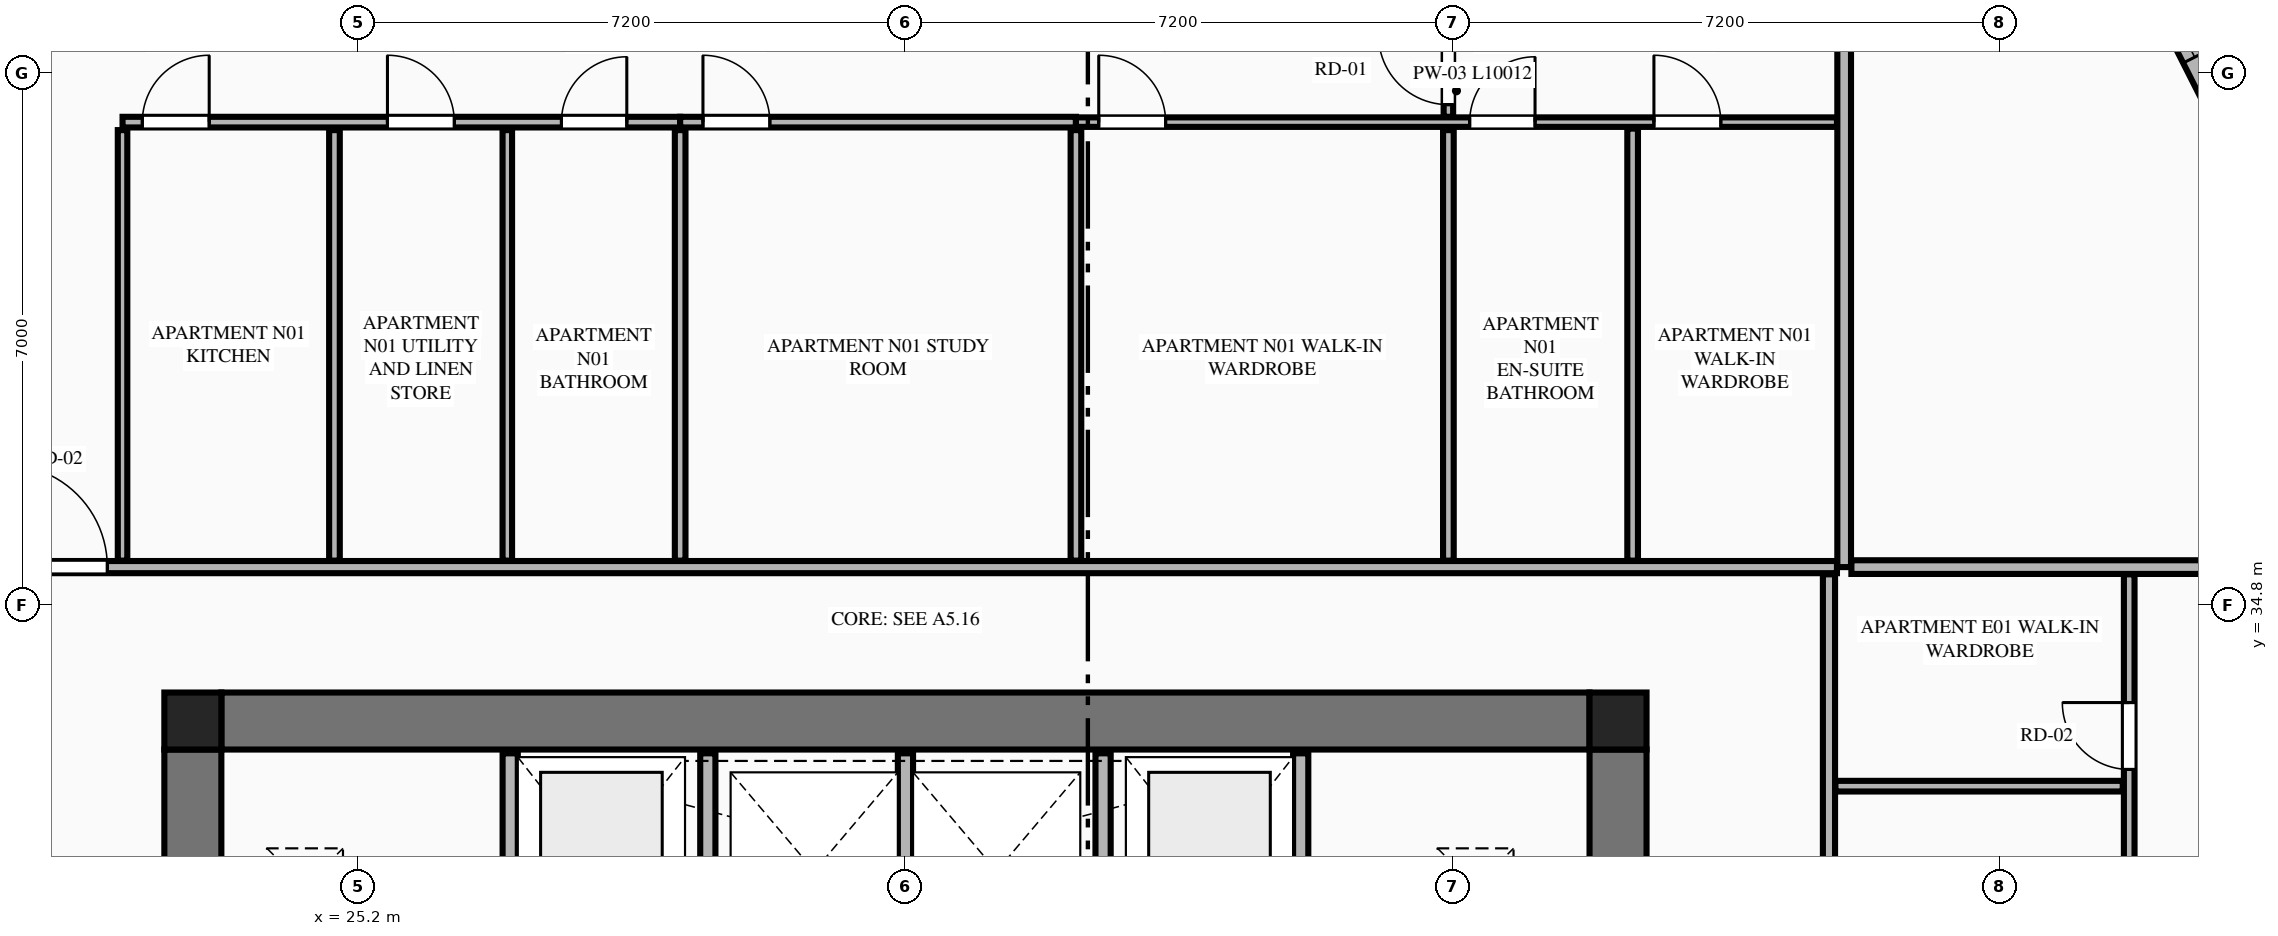
"""IFC4 building model, lengths in metres.
Left out: names, types, materials, properties, quantities, classifications, styles, units other than length and angle.
Written with IfcOpenShell. Run it as: python <this file> out.ifc"""

import sys

from ifc_helpers import new_model, si_unit, direction, frame, frame_2d, origin, origin_2d, place, context, subcontext, project, spatial, rectangle, extrude, element, fill, save


model = new_model("IFC4")
c1 = context("Model", 3, precision=1e-05, world=origin(), true_north=direction((0.0, 1.0)))
c2 = subcontext(c1, "Body", "Model", "MODEL_VIEW")
j1 = project(units=[si_unit("LENGTHUNIT", "METRE"), si_unit("PLANEANGLEUNIT", "RADIAN")], contexts=[c1])
p1 = place(None, origin())
s1 = spatial("IfcSite", under=j1, at=p1, CompositionType="ELEMENT")
p2 = place(p1, origin())
s2 = spatial("IfcBuilding", under=s1, at=p2, CompositionType="ELEMENT")
p3 = place(p2, frame((0.0, 0.0, 130.35)))
s3 = spatial("IfcBuildingStorey", under=s2, at=p3, CompositionType="ELEMENT", Elevation=130.35)
for number, where, z_axis, x_axis in (
    (1, (41.775, 33.275, 0.0), (0.0, 0.0, 1.0), (1.0, 0.0, 0.0)),
    (2, (23.025, 33.275, 0.0), (0.0, 0.0, 1.0), (1.0, 0.0, 0.0)),
):
    element("IfcColumn", number, at=place(p3, frame(where, z_axis=z_axis, x_axis=x_axis)), inside=s3, PredefinedType="COLUMN", context=c2, shape_type="SweptSolid", body=[
        extrude(rectangle(XDim=0.75, YDim=0.75, at=origin_2d()), origin(), (0.0, 0.0, 1.0), 3.55),
    ])
p4 = place(p3, frame((23.4, 33.275, 0.0), z_axis=(0.0, 0.0, 1.0), x_axis=(1.0, 0.0, 0.0)))
e3 = element("IfcWall", 3, at=p4, inside=s3, PredefinedType="SHEAR", context=c2, shape_type="SweptSolid", body=[
    extrude(rectangle(XDim=18.0, YDim=0.75, at=frame_2d((9.0, 0.0))), origin(), (0.0, 0.0, 1.0), 3.34),
])
p5 = place(p3, frame((23.025, 18.9, 0.0), z_axis=(0.0, 0.0, 1.0), x_axis=(0.0, 1.0, 0.0)))
e4 = element("IfcWall", 4, at=p5, inside=s3, PredefinedType="SHEAR", context=c2, shape_type="SweptSolid", body=[
    extrude(rectangle(XDim=14.0, YDim=0.75, at=frame_2d((7.0, 0.0))), origin(), (0.0, 0.0, 1.0), 3.34),
])
p6 = place(p5, frame((2.94, 0.0, 0.0)))
e5 = element("IfcOpeningElement", 5, at=p6, cuts=e4, PredefinedType="OPENING", context=c2, shape_type="SweptSolid", body=[
    extrude(rectangle(XDim=1.22, YDim=2.25, at=frame_2d((0.61, 1.125))), frame((0.0, 0.385, 0.0), z_axis=(0.0, -1.0, 0.0), x_axis=(1.0, 0.0, 0.0)), (0.0, 0.0, 1.0), 0.77),
])
p7 = place(p3, frame((41.775, 18.9, 0.0), z_axis=(0.0, 0.0, 1.0), x_axis=(0.0, 1.0, 0.0)))
e6 = element("IfcWall", 6, at=p7, inside=s3, PredefinedType="SHEAR", context=c2, shape_type="SweptSolid", body=[
    extrude(rectangle(XDim=14.0, YDim=0.75, at=frame_2d((7.0, 0.0))), origin(), (0.0, 0.0, 1.0), 3.34),
])
p8 = place(p7, frame((2.94, 0.0, 0.0)))
e7 = element("IfcOpeningElement", 7, at=p8, cuts=e6, PredefinedType="OPENING", context=c2, shape_type="SweptSolid", body=[
    extrude(rectangle(XDim=1.22, YDim=2.25, at=frame_2d((0.61, 1.125))), frame((0.0, 0.385, 0.0), z_axis=(0.0, -1.0, 0.0), x_axis=(1.0, 0.0, 0.0)), (0.0, 0.0, 1.0), 0.77),
])
for number, where, z_axis, x_axis in (
    (8, (27.2, 30.0, 0.0), (0.0, 0.0, 1.0), (0.0, 1.0, 0.0)),
    (9, (29.8, 30.0, 0.0), (0.0, 0.0, 1.0), (0.0, 1.0, 0.0)),
    (10, (32.4, 30.0, 0.0), (0.0, 0.0, 1.0), (0.0, 1.0, 0.0)),
    (11, (35.0, 30.0, 0.0), (0.0, 0.0, 1.0), (0.0, 1.0, 0.0)),
    (12, (37.6, 30.0, 0.0), (0.0, 0.0, 1.0), (0.0, 1.0, 0.0)),
):
    element("IfcWall", number, at=place(p3, frame(where, z_axis=z_axis, x_axis=x_axis)), inside=s3, PredefinedType="PLUMBINGWALL", context=c2, shape_type="SweptSolid", body=[
        extrude(rectangle(XDim=2.85, YDim=0.2, at=frame_2d((1.425, 0.0))), origin(), (0.0, 0.0, 1.0), 3.34),
    ])
p9 = place(p3, frame((50.251, 40.251, 0.0), z_axis=(0.0, 0.0, 1.0), x_axis=(-0.451548465867, 0.892246593142, 0.0)))
e13 = element("IfcWall", 13, at=p9, inside=s3, PredefinedType="STANDARD", context=c2, shape_type="SweptSolid", body=[
    extrude(rectangle(XDim=5.04, YDim=0.34, at=frame_2d((2.52, 0.0))), origin(), (0.0, 0.0, 1.0), 2.797),
])
p10 = place(p9, frame((1.97, 0.0, 0.75)))
e14 = element("IfcOpeningElement", 14, at=p10, cuts=e13, PredefinedType="OPENING", context=c2, shape_type="SweptSolid", body=[
    extrude(rectangle(XDim=1.1, YDim=1.897, at=frame_2d((0.55, 0.948))), frame((0.0, 0.18, 0.0), z_axis=(0.0, -1.0, 0.0), x_axis=(1.0, 0.0, 0.0)), (0.0, 0.0, 1.0), 0.36),
])
p11 = place(p3, frame((44.75, 35.3, 0.0), z_axis=(0.0, 0.0, 1.0), x_axis=(0.0, 1.0, 0.0)))
e15 = element("IfcWall", 15, at=p11, inside=s3, PredefinedType="PARTITIONING", context=c2, shape_type="SweptSolid", body=[
    extrude(rectangle(XDim=12.195, YDim=0.18, at=frame_2d((6.098, 0.0))), origin(), (0.0, 0.0, 1.0), 3.34),
])
p12 = place(p3, frame((20.145, 35.3, 0.0), z_axis=(0.0, 0.0, 1.0), x_axis=(1.0, 0.0, 0.0)))
e16 = element("IfcWall", 16, at=p12, inside=s3, PredefinedType="PARTITIONING", context=c2, shape_type="SweptSolid", body=[
    extrude(rectangle(XDim=24.51, YDim=0.16, at=frame_2d((12.255, 0.0))), origin(), (0.0, 0.0, 1.0), 3.34),
])
p13 = place(p12, frame((0.405, 0.0, 0.0)))
e17 = element("IfcOpeningElement", 17, at=p13, cuts=e16, PredefinedType="OPENING", context=c2, shape_type="SweptSolid", body=[
    extrude(rectangle(XDim=1.35, YDim=2.35, at=frame_2d((0.675, 1.175))), frame((0.0, 0.09, 0.0), z_axis=(0.0, -1.0, 0.0), x_axis=(1.0, 0.0, 0.0)), (0.0, 0.0, 1.0), 0.18),
])
p14 = place(p3, frame((22.1, 35.385, 0.0), z_axis=(0.0, 0.0, 1.0), x_axis=(0.0, 1.0, 0.0)))
e18 = element("IfcWall", 18, at=p14, inside=s3, PredefinedType="PARTITIONING", context=c2, shape_type="SweptSolid", body=[
    extrude(rectangle(XDim=5.664, YDim=0.125, at=frame_2d((2.832, 0.0))), origin(), (0.0, 0.0, 1.0), 2.722),
])
p15 = place(p3, frame((22.1, 41.154, 0.0), z_axis=(0.0, 0.0, 1.0), x_axis=(1.0, 0.0, 0.0)))
e19 = element("IfcWall", 19, at=p15, inside=s3, PredefinedType="PLUMBINGWALL", context=c2, shape_type="SweptSolid", body=[
    extrude(rectangle(XDim=7.336, YDim=0.14, at=frame_2d((3.668, 0.0))), origin(), (0.0, 0.0, 1.0), 3.34),
])
p16 = place(p15, frame((5.774, 0.0, 0.0)))
e20 = element("IfcOpeningElement", 20, at=p16, cuts=e19, PredefinedType="OPENING", context=c2, shape_type="SweptSolid", body=[
    extrude(rectangle(XDim=0.86, YDim=2.1, at=frame_2d((0.43, 1.05))), frame((0.0, 0.08, 0.0), z_axis=(0.0, -1.0, 0.0), x_axis=(1.0, 0.0, 0.0)), (0.0, 0.0, 1.0), 0.16),
])
p17 = place(p15, frame((0.26, 0.0, 0.0)))
e21 = element("IfcOpeningElement", 21, at=p17, cuts=e19, PredefinedType="OPENING", context=c2, shape_type="SweptSolid", body=[
    extrude(rectangle(XDim=0.88, YDim=2.15, at=frame_2d((0.44, 1.075))), frame((0.0, 0.08, 0.0), z_axis=(0.0, -1.0, 0.0), x_axis=(1.0, 0.0, 0.0)), (0.0, 0.0, 1.0), 0.16),
])
p18 = place(p15, frame((3.485, 0.0, 0.0)))
e22 = element("IfcOpeningElement", 22, at=p18, cuts=e19, PredefinedType="OPENING", context=c2, shape_type="SweptSolid", body=[
    extrude(rectangle(XDim=0.88, YDim=2.15, at=frame_2d((0.44, 1.075))), frame((0.0, 0.08, 0.0), z_axis=(0.0, -1.0, 0.0), x_axis=(1.0, 0.0, 0.0)), (0.0, 0.0, 1.0), 0.16),
])
p19 = place(p3, frame((29.436, 41.154, 0.0), z_axis=(0.0, 0.0, 1.0), x_axis=(1.0, 0.0, 0.0)))
e23 = element("IfcWall", 23, at=p19, inside=s3, PredefinedType="PLUMBINGWALL", context=c2, shape_type="SweptSolid", body=[
    extrude(rectangle(XDim=5.207, YDim=0.14, at=frame_2d((2.604, 0.0))), origin(), (0.0, 0.0, 1.0), 3.34),
])
p20 = place(p19, frame((0.3, 0.0, 0.0)))
e24 = element("IfcOpeningElement", 24, at=p20, cuts=e23, PredefinedType="OPENING", context=c2, shape_type="SweptSolid", body=[
    extrude(rectangle(XDim=0.88, YDim=2.15, at=frame_2d((0.44, 1.075))), frame((0.0, 0.08, 0.0), z_axis=(0.0, -1.0, 0.0), x_axis=(1.0, 0.0, 0.0)), (0.0, 0.0, 1.0), 0.16),
])
p21 = place(p3, frame((34.643, 41.154, 0.0), z_axis=(0.0, 0.0, 1.0), x_axis=(1.0, 0.0, 0.0)))
e25 = element("IfcWall", 25, at=p21, inside=s3, PredefinedType="PARTITIONING", context=c2, shape_type="SweptSolid", body=[
    extrude(rectangle(XDim=10.012, YDim=0.125, at=frame_2d((5.006, 0.0))), origin(), (0.0, 0.0, 1.0), 3.34),
])
p22 = place(p21, frame((5.18, 0.0, 0.0)))
e26 = element("IfcOpeningElement", 26, at=p22, cuts=e25, PredefinedType="OPENING", context=c2, shape_type="SweptSolid", body=[
    extrude(rectangle(XDim=0.86, YDim=2.1, at=frame_2d((0.43, 1.05))), frame((0.0, 0.073, 0.0), z_axis=(0.0, -1.0, 0.0), x_axis=(1.0, 0.0, 0.0)), (0.0, 0.0, 1.0), 0.145),
])
p23 = place(p21, frame((7.604, 0.0, 0.0)))
e27 = element("IfcOpeningElement", 27, at=p23, cuts=e25, PredefinedType="OPENING", context=c2, shape_type="SweptSolid", body=[
    extrude(rectangle(XDim=0.88, YDim=2.15, at=frame_2d((0.44, 1.075))), frame((0.0, 0.073, 0.0), z_axis=(0.0, -1.0, 0.0), x_axis=(1.0, 0.0, 0.0)), (0.0, 0.0, 1.0), 0.145),
])
p24 = place(p21, frame((0.3, 0.0, 0.0)))
e28 = element("IfcOpeningElement", 28, at=p24, cuts=e25, PredefinedType="OPENING", context=c2, shape_type="SweptSolid", body=[
    extrude(rectangle(XDim=0.88, YDim=2.15, at=frame_2d((0.44, 1.075))), frame((0.0, 0.073, 0.0), z_axis=(0.0, -1.0, 0.0), x_axis=(1.0, 0.0, 0.0)), (0.0, 0.0, 1.0), 0.145),
])
p25 = place(p3, frame((24.888, 35.385, 0.0), z_axis=(0.0, 0.0, 1.0), x_axis=(0.0, 1.0, 0.0)))
e29 = element("IfcWall", 29, at=p25, inside=s3, PredefinedType="PLUMBINGWALL", context=c2, shape_type="SweptSolid", body=[
    extrude(rectangle(XDim=5.664, YDim=0.14, at=frame_2d((2.832, 0.0))), origin(), (0.0, 0.0, 1.0), 3.34),
])
p26 = place(p3, frame((27.162, 35.385, 0.0), z_axis=(0.0, 0.0, 1.0), x_axis=(0.0, 1.0, 0.0)))
e30 = element("IfcWall", 30, at=p26, inside=s3, PredefinedType="PARTITIONING", context=c2, shape_type="SweptSolid", body=[
    extrude(rectangle(XDim=5.664, YDim=0.125, at=frame_2d((2.832, 0.0))), origin(), (0.0, 0.0, 1.0), 3.34),
])
p27 = place(p3, frame((39.543, 41.224, 0.0), z_axis=(0.0, 0.0, 1.0), x_axis=(0.0, 1.0, 0.0)))
e31 = element("IfcWall", 31, at=p27, inside=s3, PredefinedType="PARTITIONING", context=c2, shape_type="SweptSolid", body=[
    extrude(rectangle(XDim=1.33, YDim=0.125, at=frame_2d((0.665, 0.0))), origin(), (0.0, 0.0, 1.0), 3.34),
])
p28 = place(p27, frame((0.16, 0.0, 0.0)))
e32 = element("IfcOpeningElement", 32, at=p28, cuts=e31, PredefinedType="OPENING", context=c2, shape_type="SweptSolid", body=[
    extrude(rectangle(XDim=0.92, YDim=2.15, at=frame_2d((0.46, 1.075))), frame((0.0, 0.073, 0.0), z_axis=(0.0, -1.0, 0.0), x_axis=(1.0, 0.0, 0.0)), (0.0, 0.0, 1.0), 0.145),
])
for number, where, z_axis, x_axis in (
    (33, (29.436, 35.385, 0.0), (0.0, 0.0, 1.0), (0.0, 1.0, 0.0)),
    (34, (34.643, 35.385, 0.0), (0.0, 0.0, 1.0), (0.0, 1.0, 0.0)),
    (35, (39.543, 35.385, 0.0), (0.0, 0.0, 1.0), (0.0, 1.0, 0.0)),
):
    element("IfcWall", number, at=place(p3, frame(where, z_axis=z_axis, x_axis=x_axis)), inside=s3, PredefinedType="PLUMBINGWALL", context=c2, shape_type="SweptSolid", body=[
        extrude(rectangle(XDim=5.664, YDim=0.14, at=frame_2d((2.832, 0.0))), origin(), (0.0, 0.0, 1.0), 3.34),
    ])
p29 = place(p3, frame((41.967, 35.385, 0.0), z_axis=(0.0, 0.0, 1.0), x_axis=(0.0, 1.0, 0.0)))
e36 = element("IfcWall", 36, at=p29, inside=s3, PredefinedType="PLUMBINGWALL", context=c2, shape_type="SweptSolid", body=[
    extrude(rectangle(XDim=5.684, YDim=0.14, at=frame_2d((2.842, 0.0))), origin(), (0.0, 0.0, 1.0), 2.722),
])
p30 = place(p3, frame((44.845, 35.3, 0.0), z_axis=(0.0, 0.0, 1.0), x_axis=(1.0, 0.0, 0.0)))
e37 = element("IfcWall", 37, at=p30, inside=s3, PredefinedType="PARTITIONING", context=c2, shape_type="SweptSolid", body=[
    extrude(rectangle(XDim=7.669, YDim=0.18, at=frame_2d((3.834, 0.0))), origin(), (0.0, 0.0, 1.0), 3.34),
])
p31 = place(p3, frame((44.55, 16.595, 0.0), z_axis=(0.0, 0.0, 1.0), x_axis=(0.0, 1.0, 0.0)))
e38 = element("IfcWall", 38, at=p31, inside=s3, PredefinedType="PARTITIONING", context=c2, shape_type="SweptSolid", body=[
    extrude(rectangle(XDim=18.61, YDim=0.16, at=frame_2d((9.305, 0.0))), origin(), (0.0, 0.0, 1.0), 3.34),
])
p32 = place(p31, frame((0.45, 0.0, 0.0)))
e39 = element("IfcOpeningElement", 39, at=p32, cuts=e38, PredefinedType="OPENING", context=c2, shape_type="SweptSolid", body=[
    extrude(rectangle(XDim=1.02, YDim=2.25, at=frame_2d((0.51, 1.125))), frame((0.0, 0.09, 0.0), z_axis=(0.0, -1.0, 0.0), x_axis=(1.0, 0.0, 0.0)), (0.0, 0.0, 1.0), 0.18),
])
p33 = place(p3, frame((48.5, 28.758, 0.0), z_axis=(0.0, 0.0, 1.0), x_axis=(0.0, 1.0, 0.0)))
e40 = element("IfcWall", 40, at=p33, inside=s3, PredefinedType="PLUMBINGWALL", context=c2, shape_type="SweptSolid", body=[
    extrude(rectangle(XDim=6.447, YDim=0.14, at=frame_2d((3.224, 0.0))), origin(), (0.0, 0.0, 1.0), 3.34),
])
p34 = place(p33, frame((0.22, 0.0, 0.0)))
e41 = element("IfcOpeningElement", 41, at=p34, cuts=e40, PredefinedType="OPENING", context=c2, shape_type="SweptSolid", body=[
    extrude(rectangle(XDim=0.86, YDim=2.1, at=frame_2d((0.43, 1.05))), frame((0.0, 0.08, 0.0), z_axis=(0.0, -1.0, 0.0), x_axis=(1.0, 0.0, 0.0)), (0.0, 0.0, 1.0), 0.16),
])
p35 = place(p33, frame((3.88, 0.0, 0.0)))
e42 = element("IfcOpeningElement", 42, at=p35, cuts=e40, PredefinedType="OPENING", context=c2, shape_type="SweptSolid", body=[
    extrude(rectangle(XDim=0.88, YDim=2.15, at=frame_2d((0.44, 1.075))), frame((0.0, 0.08, 0.0), z_axis=(0.0, -1.0, 0.0), x_axis=(1.0, 0.0, 0.0)), (0.0, 0.0, 1.0), 0.16),
])
p36 = place(p3, frame((44.635, 32.418, 0.0), z_axis=(0.0, 0.0, 1.0), x_axis=(1.0, 0.0, 0.0)))
e43 = element("IfcWall", 43, at=p36, inside=s3, PredefinedType="PLUMBINGWALL", context=c2, shape_type="SweptSolid", body=[
    extrude(rectangle(XDim=3.78, YDim=0.14, at=frame_2d((1.89, 0.0))), origin(), (0.0, 0.0, 1.0), 3.34),
])
p37 = place(p10, origin())
e44 = element("IfcWindow", 44, at=p37, inside=s3, PartitioningType="SINGLE_PANEL", PredefinedType="WINDOW", context=c2, shape_type="SweptSolid", body=[
    extrude(rectangle(XDim=1.1, YDim=1.897, at=frame_2d((0.55, 0.948))), frame((0.0, 0.03, 0.0), z_axis=(0.0, -1.0, 0.0), x_axis=(1.0, 0.0, 0.0)), (0.0, 0.0, 1.0), 0.06),
])
fill(e14, e44)
p38 = place(p16, origin())
e45 = element("IfcDoor", 45, at=p38, inside=s3, OperationType="SINGLE_SWING_RIGHT", PredefinedType="DOOR", context=c2, shape_type="SweptSolid", body=[
    extrude(rectangle(XDim=0.86, YDim=2.1, at=frame_2d((0.43, 1.05))), frame((0.0, 0.025, 0.0), z_axis=(0.0, -1.0, 0.0), x_axis=(1.0, 0.0, 0.0)), (0.0, 0.0, 1.0), 0.05),
])
fill(e20, e45)
p39 = place(p22, origin())
e46 = element("IfcDoor", 46, at=p39, inside=s3, OperationType="SINGLE_SWING_RIGHT", PredefinedType="DOOR", context=c2, shape_type="SweptSolid", body=[
    extrude(rectangle(XDim=0.86, YDim=2.1, at=frame_2d((0.43, 1.05))), frame((0.0, 0.025, 0.0), z_axis=(0.0, -1.0, 0.0), x_axis=(1.0, 0.0, 0.0)), (0.0, 0.0, 1.0), 0.05),
])
fill(e26, e46)
p40 = place(p23, origin())
e47 = element("IfcDoor", 47, at=p40, inside=s3, OperationType="SINGLE_SWING_LEFT", PredefinedType="DOOR", context=c2, shape_type="SweptSolid", body=[
    extrude(rectangle(XDim=0.88, YDim=2.15, at=frame_2d((0.44, 1.075))), frame((0.0, 0.025, 0.0), z_axis=(0.0, -1.0, 0.0), x_axis=(1.0, 0.0, 0.0)), (0.0, 0.0, 1.0), 0.05),
])
fill(e27, e47)
p41 = place(p13, origin())
e48 = element("IfcDoor", 48, at=p41, inside=s3, OperationType="SINGLE_SWING_LEFT", PredefinedType="DOOR", context=c2, shape_type="SweptSolid", body=[
    extrude(rectangle(XDim=1.35, YDim=2.35, at=frame_2d((0.675, 1.175))), frame((0.0, 0.025, 0.0), z_axis=(0.0, -1.0, 0.0), x_axis=(1.0, 0.0, 0.0)), (0.0, 0.0, 1.0), 0.05),
])
fill(e17, e48)
p42 = place(p17, origin())
e49 = element("IfcDoor", 49, at=p42, inside=s3, OperationType="SINGLE_SWING_RIGHT", PredefinedType="DOOR", context=c2, shape_type="SweptSolid", body=[
    extrude(rectangle(XDim=0.88, YDim=2.15, at=frame_2d((0.44, 1.075))), frame((0.0, 0.025, 0.0), z_axis=(0.0, -1.0, 0.0), x_axis=(1.0, 0.0, 0.0)), (0.0, 0.0, 1.0), 0.05),
])
fill(e21, e49)
p43 = place(p18, origin())
e50 = element("IfcDoor", 50, at=p43, inside=s3, OperationType="SINGLE_SWING_LEFT", PredefinedType="DOOR", context=c2, shape_type="SweptSolid", body=[
    extrude(rectangle(XDim=0.88, YDim=2.15, at=frame_2d((0.44, 1.075))), frame((0.0, 0.025, 0.0), z_axis=(0.0, -1.0, 0.0), x_axis=(1.0, 0.0, 0.0)), (0.0, 0.0, 1.0), 0.05),
])
fill(e22, e50)
p44 = place(p20, origin())
e51 = element("IfcDoor", 51, at=p44, inside=s3, OperationType="SINGLE_SWING_LEFT", PredefinedType="DOOR", context=c2, shape_type="SweptSolid", body=[
    extrude(rectangle(XDim=0.88, YDim=2.15, at=frame_2d((0.44, 1.075))), frame((0.0, 0.025, 0.0), z_axis=(0.0, -1.0, 0.0), x_axis=(1.0, 0.0, 0.0)), (0.0, 0.0, 1.0), 0.05),
])
fill(e24, e51)
p45 = place(p28, origin())
e52 = element("IfcDoor", 52, at=p45, inside=s3, OperationType="SINGLE_SWING_RIGHT", PredefinedType="DOOR", context=c2, shape_type="SweptSolid", body=[
    extrude(rectangle(XDim=0.92, YDim=2.15, at=frame_2d((0.46, 1.075))), frame((0.0, 0.025, 0.0), z_axis=(0.0, -1.0, 0.0), x_axis=(1.0, 0.0, 0.0)), (0.0, 0.0, 1.0), 0.05),
])
fill(e32, e52)
p46 = place(p24, origin())
e53 = element("IfcDoor", 53, at=p46, inside=s3, OperationType="SINGLE_SWING_LEFT", PredefinedType="DOOR", context=c2, shape_type="SweptSolid", body=[
    extrude(rectangle(XDim=0.88, YDim=2.15, at=frame_2d((0.44, 1.075))), frame((0.0, 0.025, 0.0), z_axis=(0.0, -1.0, 0.0), x_axis=(1.0, 0.0, 0.0)), (0.0, 0.0, 1.0), 0.05),
])
fill(e28, e53)
p47 = place(p35, origin())
e54 = element("IfcDoor", 54, at=p47, inside=s3, OperationType="SINGLE_SWING_RIGHT", PredefinedType="DOOR", context=c2, shape_type="SweptSolid", body=[
    extrude(rectangle(XDim=0.88, YDim=2.15, at=frame_2d((0.44, 1.075))), frame((0.0, 0.025, 0.0), z_axis=(0.0, -1.0, 0.0), x_axis=(1.0, 0.0, 0.0)), (0.0, 0.0, 1.0), 0.05),
])
fill(e42, e54)
save(model, sys.argv[1])
